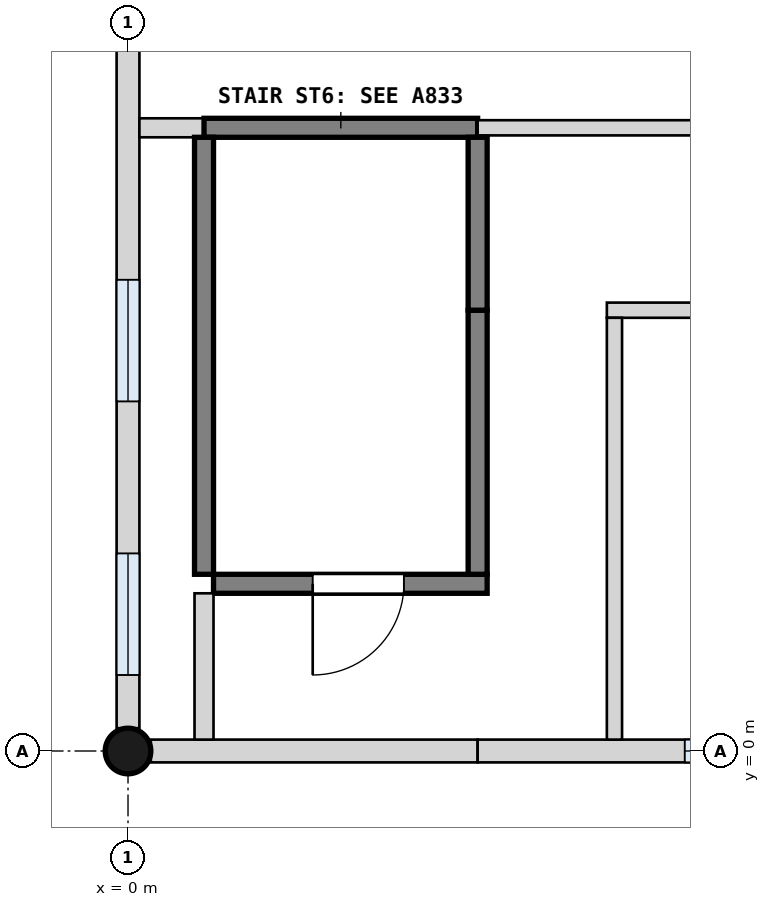
"""IFC4 building model, lengths in metres.
Left out: names, types, materials, properties, quantities, classifications, styles, units other than length and angle.
Written with IfcOpenShell. Run it as: python <this file> out.ifc"""

import sys

from ifc_helpers import new_model, si_unit, direction, frame, frame_2d, origin, origin_with_axes, origin_2d, place, context, subcontext, project, spatial, rectangle, circle, extrude, element, fill, save


model = new_model("IFC4")
c1 = context("Model", 3, precision=1e-05, world=origin(), true_north=direction((0.0, 1.0)))
c2 = subcontext(c1, "Body", "Model", "MODEL_VIEW")
j1 = project(units=[si_unit("LENGTHUNIT", "METRE"), si_unit("PLANEANGLEUNIT", "RADIAN")], contexts=[c1])
p1 = place(None, origin())
s1 = spatial("IfcSite", under=j1, at=p1, CompositionType="ELEMENT")
p2 = place(p1, origin())
s2 = spatial("IfcBuilding", under=s1, at=p2, CompositionType="ELEMENT")
p3 = place(p2, frame((0.0, 0.0, 4.2)))
s3 = spatial("IfcBuildingStorey", under=s2, at=p3, CompositionType="ELEMENT", Elevation=4.2)
p4 = place(p3, origin_with_axes())
e1 = element("IfcColumn", 1, at=p4, inside=s3, PredefinedType="COLUMN", context=c2, shape_type="SweptSolid", body=[
    extrude(circle(Radius=0.3, at=origin_2d()), origin(), (0.0, 0.0, 1.0), 4.2),
])
p5 = place(p3, frame((0.3, 0.0, 0.0), z_axis=(0.0, 0.0, 1.0), x_axis=(1.0, 0.0, 0.0)))
e2 = element("IfcWall", 2, at=p5, inside=s3, PredefinedType="SOLIDWALL", context=c2, shape_type="SweptSolid", body=[
    extrude(rectangle(XDim=4.3, YDim=0.3, at=frame_2d((2.15, 0.0))), origin(), (0.0, 0.0, 1.0), 3.0),
])
p6 = place(p3, frame((4.6, 0.0, 0.0), z_axis=(0.0, 0.0, 1.0), x_axis=(1.0, 0.0, 0.0)))
e3 = element("IfcWall", 3, at=p6, inside=s3, PredefinedType="SOLIDWALL", context=c2, shape_type="SweptSolid", body=[
    extrude(rectangle(XDim=7.9, YDim=0.3, at=frame_2d((3.95, 0.0))), origin(), (0.0, 0.0, 1.0), 3.0),
])
p7 = place(p6, frame((2.725, 0.0, 1.0)))
e4 = element("IfcOpeningElement", 4, at=p7, cuts=e3, PredefinedType="OPENING", context=c2, shape_type="SweptSolid", body=[
    extrude(rectangle(XDim=1.6, YDim=1.8, at=frame_2d((0.8, 0.9))), frame((0.0, 0.16, 0.0), z_axis=(0.0, -1.0, 0.0), x_axis=(1.0, 0.0, 0.0)), (0.0, 0.0, 1.0), 0.32),
])
p8 = place(p6, frame((5.5, 0.0, 1.0)))
e5 = element("IfcOpeningElement", 5, at=p8, cuts=e3, PredefinedType="OPENING", context=c2, shape_type="SweptSolid", body=[
    extrude(rectangle(XDim=1.6, YDim=1.8, at=frame_2d((0.8, 0.9))), frame((0.0, 0.16, 0.0), z_axis=(0.0, -1.0, 0.0), x_axis=(1.0, 0.0, 0.0)), (0.0, 0.0, 1.0), 0.32),
])
p9 = place(p3, frame((0.0, 0.3, 0.0), z_axis=(0.0, 0.0, 1.0), x_axis=(0.0, 1.0, 0.0)))
e6 = element("IfcWall", 6, at=p9, inside=s3, PredefinedType="SOLIDWALL", context=c2, shape_type="SweptSolid", body=[
    extrude(rectangle(XDim=13.8, YDim=0.3, at=frame_2d((6.9, 0.0))), origin(), (0.0, 0.0, 1.0), 2.9),
])
p10 = place(p9, frame((0.7, 0.0, 1.0)))
e7 = element("IfcOpeningElement", 7, at=p10, cuts=e6, PredefinedType="OPENING", context=c2, shape_type="SweptSolid", body=[
    extrude(rectangle(XDim=1.6, YDim=1.8, at=frame_2d((0.8, 0.9))), frame((0.0, 0.16, 0.0), z_axis=(0.0, -1.0, 0.0), x_axis=(1.0, 0.0, 0.0)), (0.0, 0.0, 1.0), 0.32),
])
p11 = place(p9, frame((4.3, 0.0, 1.0)))
e8 = element("IfcOpeningElement", 8, at=p11, cuts=e6, PredefinedType="OPENING", context=c2, shape_type="SweptSolid", body=[
    extrude(rectangle(XDim=1.6, YDim=1.8, at=frame_2d((0.8, 0.9))), frame((0.0, 0.16, 0.0), z_axis=(0.0, -1.0, 0.0), x_axis=(1.0, 0.0, 0.0)), (0.0, 0.0, 1.0), 0.32),
])
p12 = place(p9, frame((11.5, 0.0, 1.0)))
e9 = element("IfcOpeningElement", 9, at=p12, cuts=e6, PredefinedType="OPENING", context=c2, shape_type="SweptSolid", body=[
    extrude(rectangle(XDim=1.6, YDim=1.8, at=frame_2d((0.8, 0.9))), frame((0.0, 0.16, 0.0), z_axis=(0.0, -1.0, 0.0), x_axis=(1.0, 0.0, 0.0)), (0.0, 0.0, 1.0), 0.32),
])
p13 = place(p3, frame((1.125, 2.2, 0.0), z_axis=(0.0, 0.0, 1.0), x_axis=(1.0, 0.0, 0.0)))
e10 = element("IfcWall", 10, at=p13, inside=s3, PredefinedType="SHEAR", context=c2, shape_type="SweptSolid", body=[
    extrude(rectangle(XDim=3.6, YDim=0.25, at=frame_2d((1.8, 0.0))), origin(), (0.0, 0.0, 1.0), 3.9),
])
p14 = place(p13, frame((1.305, 0.0, 0.0)))
e11 = element("IfcOpeningElement", 11, at=p14, cuts=e10, PredefinedType="OPENING", context=c2, shape_type="SweptSolid", body=[
    extrude(rectangle(XDim=1.2, YDim=2.1, at=frame_2d((0.6, 1.05))), frame((0.0, 0.135, 0.0), z_axis=(0.0, -1.0, 0.0), x_axis=(1.0, 0.0, 0.0)), (0.0, 0.0, 1.0), 0.27),
])
p15 = place(p3, frame((6.3, 5.8, 0.0), z_axis=(0.0, 0.0, 1.0), x_axis=(1.0, 0.0, 0.0)))
e12 = element("IfcWall", 12, at=p15, inside=s3, PredefinedType="PARTITIONING", context=c2, shape_type="SweptSolid", body=[
    extrude(rectangle(XDim=3.3, YDim=0.2, at=frame_2d((1.65, 0.0))), origin(), (0.0, 0.0, 1.0), 3.9),
])
p16 = place(p15, frame((1.2, 0.0, 0.0)))
e13 = element("IfcOpeningElement", 13, at=p16, cuts=e12, PredefinedType="OPENING", context=c2, shape_type="SweptSolid", body=[
    extrude(rectangle(XDim=1.0, YDim=2.1, at=frame_2d((0.5, 1.05))), frame((0.0, 0.11, 0.0), z_axis=(0.0, -1.0, 0.0), x_axis=(1.0, 0.0, 0.0)), (0.0, 0.0, 1.0), 0.22),
])
p17 = place(p3, frame((0.15, 8.2, 0.0), z_axis=(0.0, 0.0, 1.0), x_axis=(1.0, 0.0, 0.0)))
e14 = element("IfcWall", 14, at=p17, inside=s3, PredefinedType="PARTITIONING", context=c2, shape_type="SweptSolid", body=[
    extrude(rectangle(XDim=0.85, YDim=0.25, at=frame_2d((0.425, 0.0))), origin(), (0.0, 0.0, 1.0), 3.9),
])
p18 = place(p3, frame((1.0, 8.2, 0.0), z_axis=(0.0, 0.0, 1.0), x_axis=(1.0, 0.0, 0.0)))
e15 = element("IfcWall", 15, at=p18, inside=s3, PredefinedType="SHEAR", context=c2, shape_type="SweptSolid", body=[
    extrude(rectangle(XDim=3.6, YDim=0.25, at=frame_2d((1.8, 0.0))), origin(), (0.0, 0.0, 1.0), 3.9),
])
p19 = place(p3, frame((4.6, 8.2, 0.0), z_axis=(0.0, 0.0, 1.0), x_axis=(1.0, 0.0, 0.0)))
e16 = element("IfcWall", 16, at=p19, inside=s3, PredefinedType="PARTITIONING", context=c2, shape_type="SweptSolid", body=[
    extrude(rectangle(XDim=7.6, YDim=0.2, at=frame_2d((3.8, 0.0))), origin(), (0.0, 0.0, 1.0), 3.9),
])
p20 = place(p19, frame((3.5, 0.0, 0.0)))
e17 = element("IfcOpeningElement", 17, at=p20, cuts=e16, PredefinedType="OPENING", context=c2, shape_type="SweptSolid", body=[
    extrude(rectangle(XDim=1.8, YDim=2.1, at=frame_2d((0.9, 1.05))), frame((0.0, 0.11, 0.0), z_axis=(0.0, -1.0, 0.0), x_axis=(1.0, 0.0, 0.0)), (0.0, 0.0, 1.0), 0.22),
])
p21 = place(p3, frame((1.0, 0.15, 0.0), z_axis=(0.0, 0.0, 1.0), x_axis=(0.0, 1.0, 0.0)))
e18 = element("IfcWall", 18, at=p21, inside=s3, PredefinedType="PARTITIONING", context=c2, shape_type="SweptSolid", body=[
    extrude(rectangle(XDim=1.925, YDim=0.25, at=frame_2d((0.962, 0.0))), origin(), (0.0, 0.0, 1.0), 3.9),
])
p22 = place(p3, frame((1.0, 2.325, 0.0), z_axis=(0.0, 0.0, 1.0), x_axis=(0.0, 1.0, 0.0)))
e19 = element("IfcWall", 19, at=p22, inside=s3, PredefinedType="SHEAR", context=c2, shape_type="SweptSolid", body=[
    extrude(rectangle(XDim=5.75, YDim=0.25, at=frame_2d((2.875, 0.0))), origin(), (0.0, 0.0, 1.0), 3.9),
])
p23 = place(p3, frame((4.6, 2.325, 0.0), z_axis=(0.0, 0.0, 1.0), x_axis=(0.0, 1.0, 0.0)))
e20 = element("IfcWall", 20, at=p23, inside=s3, PredefinedType="SHEAR", context=c2, shape_type="SweptSolid", body=[
    extrude(rectangle(XDim=3.475, YDim=0.25, at=frame_2d((1.738, 0.0))), origin(), (0.0, 0.0, 1.0), 3.9),
])
p24 = place(p3, frame((4.6, 5.8, 0.0), z_axis=(0.0, 0.0, 1.0), x_axis=(0.0, 1.0, 0.0)))
e21 = element("IfcWall", 21, at=p24, inside=s3, PredefinedType="SHEAR", context=c2, shape_type="SweptSolid", body=[
    extrude(rectangle(XDim=2.275, YDim=0.25, at=frame_2d((1.137, 0.0))), origin(), (0.0, 0.0, 1.0), 3.9),
])
p25 = place(p3, frame((6.4, 0.15, 0.0), z_axis=(0.0, 0.0, 1.0), x_axis=(0.0, 1.0, 0.0)))
e22 = element("IfcWall", 22, at=p25, inside=s3, PredefinedType="PARTITIONING", context=c2, shape_type="SweptSolid", body=[
    extrude(rectangle(XDim=5.55, YDim=0.2, at=frame_2d((2.775, 0.0))), origin(), (0.0, 0.0, 1.0), 2.9),
])
p26 = place(p14, frame((1.2, 0.0, 0.0), z_axis=(0.0, 0.0, 1.0), x_axis=(-1.0, 0.0, 0.0)))
e23 = element("IfcDoor", 23, at=p26, inside=s3, OperationType="SINGLE_SWING_RIGHT", PredefinedType="DOOR", context=c2, shape_type="SweptSolid", body=[
    extrude(rectangle(XDim=1.2, YDim=2.1, at=frame_2d((0.6, 1.05))), frame((0.0, 0.025, 0.0), z_axis=(0.0, -1.0, 0.0), x_axis=(1.0, 0.0, 0.0)), (0.0, 0.0, 1.0), 0.05),
])
fill(e11, e23)
p27 = place(p7, origin())
e24 = element("IfcWindow", 24, at=p27, inside=s3, PartitioningType="SINGLE_PANEL", PredefinedType="WINDOW", context=c2, shape_type="SweptSolid", body=[
    extrude(rectangle(XDim=1.6, YDim=1.8, at=frame_2d((0.8, 0.9))), frame((0.0, 0.03, 0.0), z_axis=(0.0, -1.0, 0.0), x_axis=(1.0, 0.0, 0.0)), (0.0, 0.0, 1.0), 0.06),
])
fill(e4, e24)
p28 = place(p10, origin())
e25 = element("IfcWindow", 25, at=p28, inside=s3, PartitioningType="SINGLE_PANEL", PredefinedType="WINDOW", context=c2, shape_type="SweptSolid", body=[
    extrude(rectangle(XDim=1.6, YDim=1.8, at=frame_2d((0.8, 0.9))), frame((0.0, 0.03, 0.0), z_axis=(0.0, -1.0, 0.0), x_axis=(1.0, 0.0, 0.0)), (0.0, 0.0, 1.0), 0.06),
])
fill(e7, e25)
p29 = place(p11, origin())
e26 = element("IfcWindow", 26, at=p29, inside=s3, PartitioningType="SINGLE_PANEL", PredefinedType="WINDOW", context=c2, shape_type="SweptSolid", body=[
    extrude(rectangle(XDim=1.6, YDim=1.8, at=frame_2d((0.8, 0.9))), frame((0.0, 0.03, 0.0), z_axis=(0.0, -1.0, 0.0), x_axis=(1.0, 0.0, 0.0)), (0.0, 0.0, 1.0), 0.06),
])
fill(e8, e26)
save(model, sys.argv[1])
